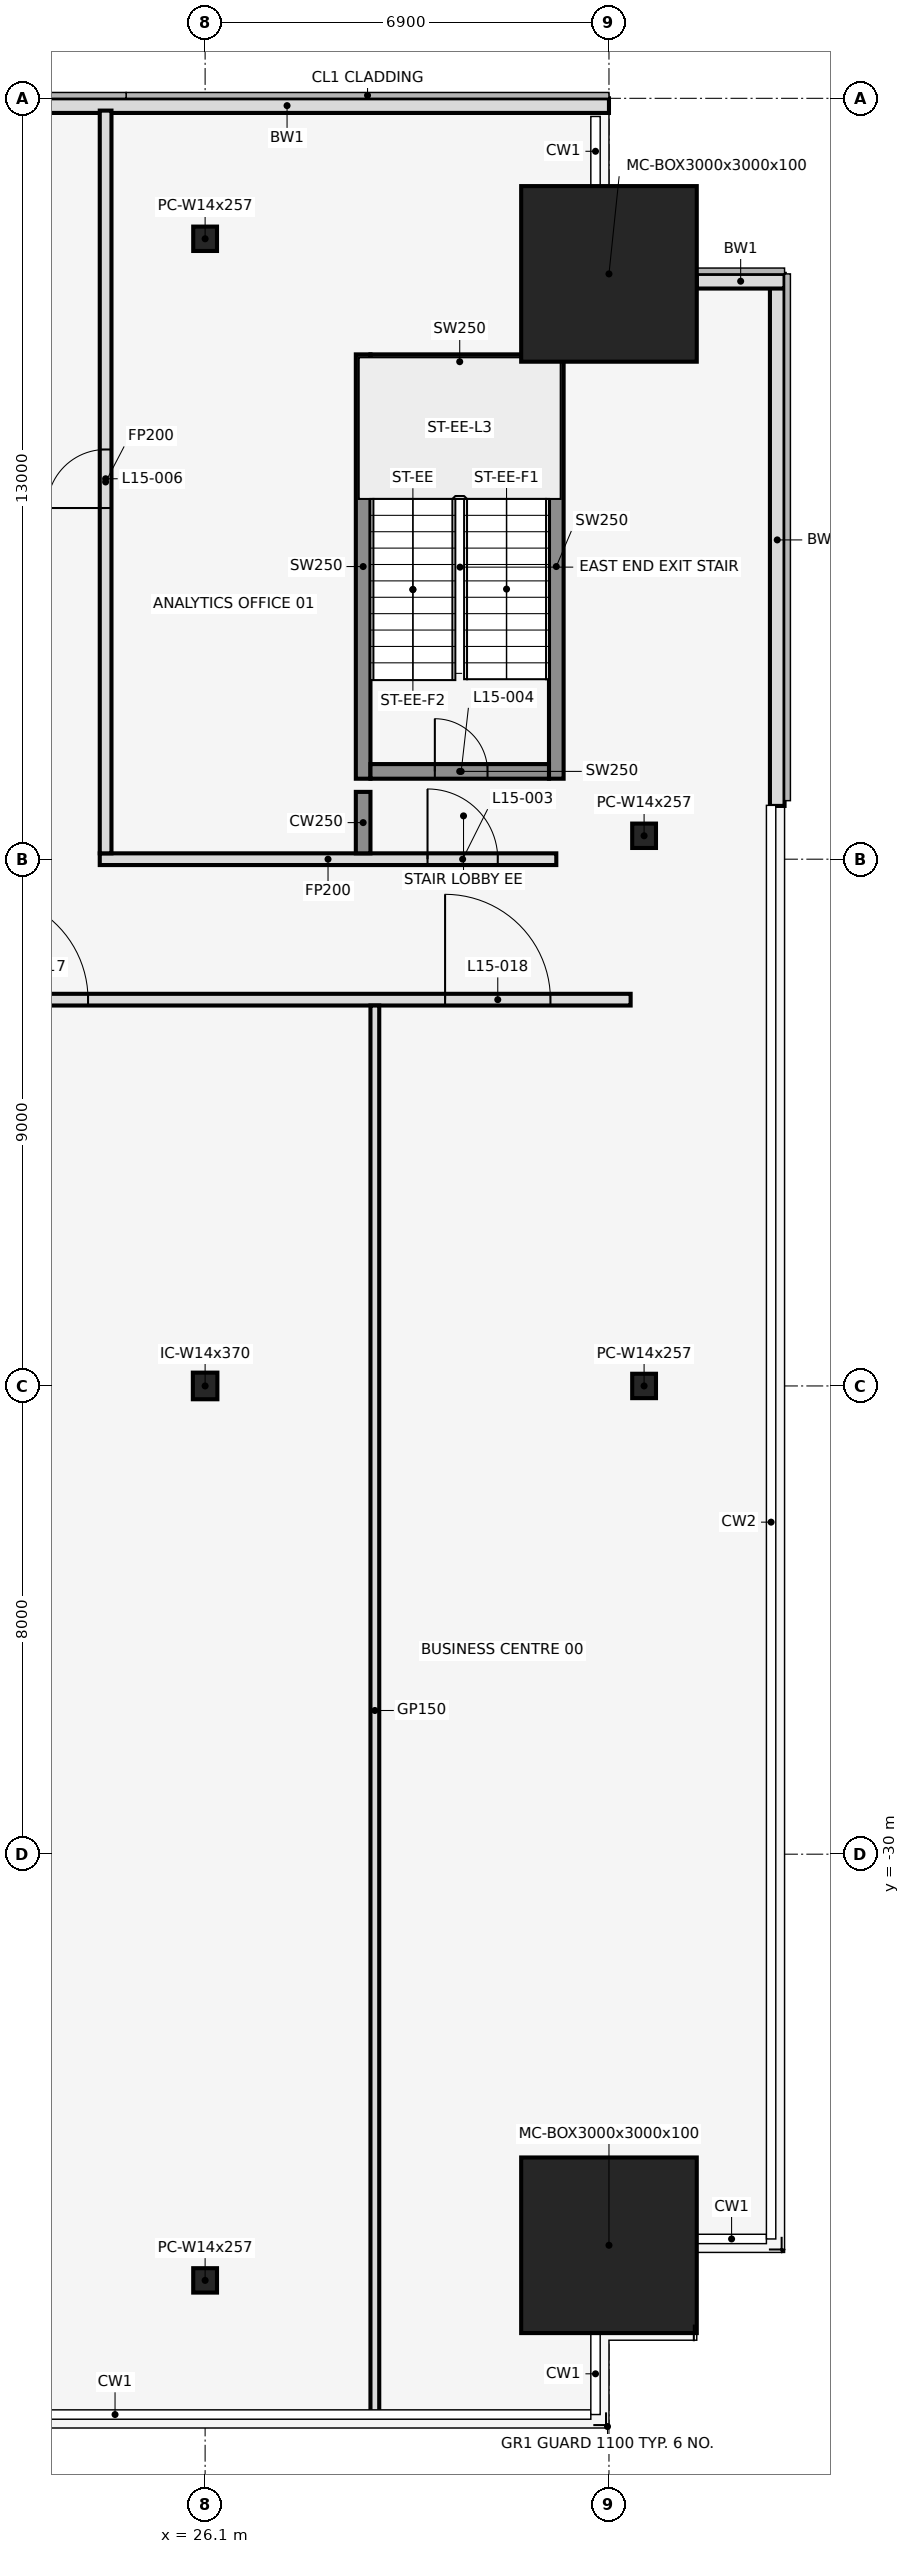
"""IFC4 building model, lengths in metres.
Left out: names, types, materials, properties, quantities, classifications, styles, units other than length and angle.
Written with IfcOpenShell. Run it as: python <this file> out.ifc"""

import sys

from ifc_helpers import new_model, si_unit, direction, frame, frame_2d, origin, origin_2d, place, context, subcontext, project, spatial, rectangle, hollow_rectangle, i_section, extrude, element, fill, save


model = new_model("IFC4")
c1 = context("Model", 3, precision=1e-05, world=origin(), true_north=direction((0.0, 1.0)))
c2 = subcontext(c1, "Body", "Model", "MODEL_VIEW")
j1 = project(units=[si_unit("LENGTHUNIT", "METRE"), si_unit("PLANEANGLEUNIT", "RADIAN")], contexts=[c1])
p1 = place(None, origin())
s1 = spatial("IfcSite", under=j1, at=p1, CompositionType="ELEMENT")
p2 = place(p1, origin())
s2 = spatial("IfcBuilding", under=s1, at=p2, CompositionType="ELEMENT")
p3 = place(p2, frame((0.0, 0.0, 75.5)))
s3 = spatial("IfcBuildingStorey", under=s2, at=p3, CompositionType="ELEMENT", Elevation=75.5)
for number, where, z_axis, x_axis in (
    (1, (26.1, -37.282, 0.0), (0.0, 0.0, 1.0), (1.0, 0.0, 0.0)),
    (2, (26.1, -2.4, 0.0), (0.0, 0.0, 1.0), (1.0, 0.0, 0.0)),
):
    element("IfcColumn", number, at=place(p3, frame(where, z_axis=z_axis, x_axis=x_axis)), inside=s3, PredefinedType="COLUMN", context=c2, shape_type="SweptSolid", body=[
        extrude(i_section(OverallWidth=0.406, OverallDepth=0.417, WebThickness=0.03, FlangeThickness=0.048, at=origin_2d()), origin(), (0.0, 0.0, 1.0), 4.5),
    ])
for number, where, z_axis, x_axis in (
    (3, (33.0, -36.682, 0.0), (0.0, 0.0, 1.0), (1.0, 0.0, 0.0)),
    (4, (33.0, -3.0, 0.0), (0.0, 0.0, 1.0), (1.0, 0.0, 0.0)),
):
    element("IfcColumn", number, at=place(p3, frame(where, z_axis=z_axis, x_axis=x_axis)), inside=s3, PredefinedType="COLUMN", context=c2, shape_type="SweptSolid", body=[
        extrude(hollow_rectangle(XDim=3.0, YDim=3.0, WallThickness=0.1, at=origin_2d()), origin(), (0.0, 0.0, 1.0), 4.5),
    ])
for number, where, z_axis, x_axis in (
    (5, (33.6, -12.6, 0.0), (0.0, 0.0, 1.0), (1.0, 0.0, 0.0)),
    (6, (33.6, -22.0, 0.0), (0.0, 0.0, 1.0), (1.0, 0.0, 0.0)),
):
    element("IfcColumn", number, at=place(p3, frame(where, z_axis=z_axis, x_axis=x_axis)), inside=s3, PredefinedType="COLUMN", context=c2, shape_type="SweptSolid", body=[
        extrude(i_section(OverallWidth=0.406, OverallDepth=0.417, WebThickness=0.03, FlangeThickness=0.048, at=origin_2d()), origin(), (0.0, 0.0, 1.0), 4.5),
    ])
p4 = place(p3, frame((26.1, -22.0, 0.0), z_axis=(0.0, 0.0, 1.0), x_axis=(1.0, 0.0, 0.0)))
e7 = element("IfcColumn", 7, at=p4, inside=s3, PredefinedType="COLUMN", context=c2, shape_type="SweptSolid", body=[
    extrude(i_section(OverallWidth=0.419, OverallDepth=0.455, WebThickness=0.042, FlangeThickness=0.068, at=origin_2d()), origin(), (0.0, 0.0, 1.0), 4.5),
])
p5 = place(p3, frame((33.0, -0.125, 0.0), z_axis=(0.0, 0.0, 1.0), x_axis=(-1.0, 0.0, 0.0)))
e8 = element("IfcWall", 8, at=p5, inside=s3, PredefinedType="STANDARD", context=c2, shape_type="SweptSolid", body=[
    extrude(rectangle(XDim=11.0, YDim=0.25, at=frame_2d((5.5, 0.0))), origin(), (0.0, 0.0, 1.0), 4.35),
])
p6 = place(p3, frame((35.875, -12.09, 0.0), z_axis=(0.0, 0.0, 1.0), x_axis=(0.0, 1.0, 0.0)))
e9 = element("IfcWall", 9, at=p6, inside=s3, PredefinedType="STANDARD", context=c2, shape_type="SweptSolid", body=[
    extrude(rectangle(XDim=9.09, YDim=0.25, at=frame_2d((4.545, 0.0))), origin(), (0.0, 0.0, 1.0), 4.35),
])
p7 = place(p3, frame((36.0, -3.125, 0.0), z_axis=(0.0, 0.0, 1.0), x_axis=(-1.0, 0.0, 0.0)))
e10 = element("IfcWall", 10, at=p7, inside=s3, PredefinedType="STANDARD", context=c2, shape_type="SweptSolid", body=[
    extrude(rectangle(XDim=1.5, YDim=0.25, at=frame_2d((0.75, 0.0))), origin(), (0.0, 0.0, 1.0), 4.35),
])
for number, where, z_axis, x_axis in (
    (11, (28.8, -11.625, 0.0), (0.0, 0.0, 1.0), (0.0, 1.0, 0.0)),
    (12, (32.1, -11.625, 0.0), (0.0, 0.0, 1.0), (0.0, 1.0, 0.0)),
):
    element("IfcWall", number, at=place(p3, frame(where, z_axis=z_axis, x_axis=x_axis)), inside=s3, PredefinedType="SHEAR", context=c2, shape_type="SweptSolid", body=[
        extrude(rectangle(XDim=7.25, YDim=0.25, at=frame_2d((3.625, 0.0))), origin(), (0.0, 0.0, 1.0), 4.5),
    ])
p8 = place(p3, frame((28.925, -11.5, 0.0), z_axis=(0.0, 0.0, 1.0), x_axis=(1.0, 0.0, 0.0)))
e13 = element("IfcWall", 13, at=p8, inside=s3, PredefinedType="SHEAR", context=c2, shape_type="SweptSolid", body=[
    extrude(rectangle(XDim=3.05, YDim=0.25, at=frame_2d((1.525, 0.0))), origin(), (0.0, 0.0, 1.0), 4.5),
])
p9 = place(p8, frame((1.1, 0.0, 0.0)))
e14 = element("IfcOpeningElement", 14, at=p9, cuts=e13, PredefinedType="OPENING", context=c2, shape_type="SweptSolid", body=[
    extrude(rectangle(XDim=0.9, YDim=2.1, at=frame_2d((0.45, 1.05))), frame((0.0, 0.137, 0.0), z_axis=(0.0, -1.0, 0.0), x_axis=(1.0, 0.0, 0.0)), (0.0, 0.0, 1.0), 0.274),
])
p10 = place(p3, frame((28.925, -4.5, 0.0), z_axis=(0.0, 0.0, 1.0), x_axis=(1.0, 0.0, 0.0)))
e15 = element("IfcWall", 15, at=p10, inside=s3, PredefinedType="SHEAR", context=c2, shape_type="SweptSolid", body=[
    extrude(rectangle(XDim=3.05, YDim=0.25, at=frame_2d((1.525, 0.0))), origin(), (0.0, 0.0, 1.0), 4.5),
])
p11 = place(p3, frame((-33.37, -15.4, 0.0), z_axis=(0.0, 0.0, 1.0), x_axis=(1.0, 0.0, 0.0)))
e16 = element("IfcWall", 16, at=p11, inside=s3, PredefinedType="PARTITIONING", context=c2, shape_type="SweptSolid", body=[
    extrude(rectangle(XDim=66.74, YDim=0.2, at=frame_2d((33.37, 0.0))), origin(), (0.0, 0.0, 1.0), 3.339),
])
p12 = place(p11, frame((1.3, 0.0, 0.0)))
e17 = element("IfcOpeningElement", 17, at=p12, cuts=e16, PredefinedType="OPENING", context=c2, shape_type="SweptSolid", body=[
    extrude(rectangle(XDim=1.8, YDim=2.1, at=frame_2d((0.9, 1.05))), frame((0.0, 0.112, 0.0), z_axis=(0.0, -1.0, 0.0), x_axis=(1.0, 0.0, 0.0)), (0.0, 0.0, 1.0), 0.224),
])
p13 = place(p11, frame((5.27, 0.0, 0.0)))
e18 = element("IfcOpeningElement", 18, at=p13, cuts=e16, PredefinedType="OPENING", context=c2, shape_type="SweptSolid", body=[
    extrude(rectangle(XDim=1.0, YDim=2.1, at=frame_2d((0.5, 1.05))), frame((0.0, 0.112, 0.0), z_axis=(0.0, -1.0, 0.0), x_axis=(1.0, 0.0, 0.0)), (0.0, 0.0, 1.0), 0.224),
])
p14 = place(p11, frame((10.77, 0.0, 0.0)))
e19 = element("IfcOpeningElement", 19, at=p14, cuts=e16, PredefinedType="OPENING", context=c2, shape_type="SweptSolid", body=[
    extrude(rectangle(XDim=1.8, YDim=2.1, at=frame_2d((0.9, 1.05))), frame((0.0, 0.112, 0.0), z_axis=(0.0, -1.0, 0.0), x_axis=(1.0, 0.0, 0.0)), (0.0, 0.0, 1.0), 0.224),
])
p15 = place(p11, frame((16.87, 0.0, 0.0)))
e20 = element("IfcOpeningElement", 20, at=p15, cuts=e16, PredefinedType="OPENING", context=c2, shape_type="SweptSolid", body=[
    extrude(rectangle(XDim=1.0, YDim=2.1, at=frame_2d((0.5, 1.05))), frame((0.0, 0.112, 0.0), z_axis=(0.0, -1.0, 0.0), x_axis=(1.0, 0.0, 0.0)), (0.0, 0.0, 1.0), 0.224),
])
p16 = place(p11, frame((22.27, 0.0, 0.0)))
e21 = element("IfcOpeningElement", 21, at=p16, cuts=e16, PredefinedType="OPENING", context=c2, shape_type="SweptSolid", body=[
    extrude(rectangle(XDim=1.8, YDim=2.1, at=frame_2d((0.9, 1.05))), frame((0.0, 0.112, 0.0), z_axis=(0.0, -1.0, 0.0), x_axis=(1.0, 0.0, 0.0)), (0.0, 0.0, 1.0), 0.224),
])
p17 = place(p11, frame((33.87, 0.0, 0.0)))
e22 = element("IfcOpeningElement", 22, at=p17, cuts=e16, PredefinedType="OPENING", context=c2, shape_type="SweptSolid", body=[
    extrude(rectangle(XDim=1.8, YDim=2.1, at=frame_2d((0.9, 1.05))), frame((0.0, 0.112, 0.0), z_axis=(0.0, -1.0, 0.0), x_axis=(1.0, 0.0, 0.0)), (0.0, 0.0, 1.0), 0.224),
])
p18 = place(p11, frame((45.97, 0.0, 0.0)))
e23 = element("IfcOpeningElement", 23, at=p18, cuts=e16, PredefinedType="OPENING", context=c2, shape_type="SweptSolid", body=[
    extrude(rectangle(XDim=0.9, YDim=2.1, at=frame_2d((0.45, 1.05))), frame((0.0, 0.112, 0.0), z_axis=(0.0, -1.0, 0.0), x_axis=(1.0, 0.0, 0.0)), (0.0, 0.0, 1.0), 0.224),
])
p19 = place(p11, frame((55.67, 0.0, 0.0)))
e24 = element("IfcOpeningElement", 24, at=p19, cuts=e16, PredefinedType="OPENING", context=c2, shape_type="SweptSolid", body=[
    extrude(rectangle(XDim=1.8, YDim=2.1, at=frame_2d((0.9, 1.05))), frame((0.0, 0.112, 0.0), z_axis=(0.0, -1.0, 0.0), x_axis=(1.0, 0.0, 0.0)), (0.0, 0.0, 1.0), 0.224),
])
p20 = place(p11, frame((63.57, 0.0, 0.0)))
e25 = element("IfcOpeningElement", 25, at=p20, cuts=e16, PredefinedType="OPENING", context=c2, shape_type="SweptSolid", body=[
    extrude(rectangle(XDim=1.8, YDim=2.1, at=frame_2d((0.9, 1.05))), frame((0.0, 0.112, 0.0), z_axis=(0.0, -1.0, 0.0), x_axis=(1.0, 0.0, 0.0)), (0.0, 0.0, 1.0), 0.224),
])
p21 = place(p3, frame((24.3, -13.0, 0.0), z_axis=(0.0, 0.0, 1.0), x_axis=(1.0, 0.0, 0.0)))
e26 = element("IfcWall", 26, at=p21, inside=s3, PredefinedType="PARTITIONING", context=c2, shape_type="SweptSolid", body=[
    extrude(rectangle(XDim=7.8, YDim=0.2, at=frame_2d((3.9, 0.0))), origin(), (0.0, 0.0, 1.0), 3.339),
])
p22 = place(p21, frame((5.6, 0.0, 0.0)))
e27 = element("IfcOpeningElement", 27, at=p22, cuts=e26, PredefinedType="OPENING", context=c2, shape_type="SweptSolid", body=[
    extrude(rectangle(XDim=1.2, YDim=2.1, at=frame_2d((0.6, 1.05))), frame((0.0, 0.112, 0.0), z_axis=(0.0, -1.0, 0.0), x_axis=(1.0, 0.0, 0.0)), (0.0, 0.0, 1.0), 0.224),
])
p23 = place(p3, frame((24.4, -12.9, 0.0), z_axis=(0.0, 0.0, 1.0), x_axis=(0.0, 1.0, 0.0)))
e28 = element("IfcWall", 28, at=p23, inside=s3, PredefinedType="PARTITIONING", context=c2, shape_type="SweptSolid", body=[
    extrude(rectangle(XDim=12.69, YDim=0.2, at=frame_2d((6.345, 0.0))), origin(), (0.0, 0.0, 1.0), 3.339),
])
p24 = place(p23, frame((5.9, 0.0, 0.0)))
e29 = element("IfcOpeningElement", 29, at=p24, cuts=e28, PredefinedType="OPENING", context=c2, shape_type="SweptSolid", body=[
    extrude(rectangle(XDim=1.0, YDim=2.1, at=frame_2d((0.5, 1.05))), frame((0.0, 0.112, 0.0), z_axis=(0.0, -1.0, 0.0), x_axis=(1.0, 0.0, 0.0)), (0.0, 0.0, 1.0), 0.224),
])
p25 = place(p3, frame((28.8, -12.9, 0.0), z_axis=(0.0, 0.0, 1.0), x_axis=(0.0, 1.0, 0.0)))
e30 = element("IfcWall", 30, at=p25, inside=s3, PredefinedType="SHEAR", context=c2, shape_type="SweptSolid", body=[
    extrude(rectangle(XDim=1.05, YDim=0.25, at=frame_2d((0.525, 0.0))), origin(), (0.0, 0.0, 1.0), 4.5),
])
p26 = place(p3, frame((29.0, -39.59, 0.0), z_axis=(0.0, 0.0, 1.0), x_axis=(0.0, 1.0, 0.0)))
e31 = element("IfcWall", 31, at=p26, inside=s3, PredefinedType="PARTITIONING", context=c2, shape_type="SweptSolid", body=[
    extrude(rectangle(XDim=24.09, YDim=0.15, at=frame_2d((12.045, 0.0))), origin(), (0.0, 0.0, 1.0), 3.339),
])
p27 = place(p22, origin())
e32 = element("IfcDoor", 32, at=p27, inside=s3, OperationType="SINGLE_SWING_RIGHT", PredefinedType="DOOR", context=c2, shape_type="SweptSolid", body=[
    extrude(rectangle(XDim=1.2, YDim=2.1, at=frame_2d((0.6, 1.05))), frame((0.0, 0.025, 0.0), z_axis=(0.0, -1.0, 0.0), x_axis=(1.0, 0.0, 0.0)), (0.0, 0.0, 1.0), 0.05),
])
fill(e27, e32)
p28 = place(p9, origin())
e33 = element("IfcDoor", 33, at=p28, inside=s3, OperationType="SINGLE_SWING_LEFT", PredefinedType="DOOR", context=c2, shape_type="SweptSolid", body=[
    extrude(rectangle(XDim=0.9, YDim=2.1, at=frame_2d((0.45, 1.05))), frame((0.0, 0.025, 0.0), z_axis=(0.0, -1.0, 0.0), x_axis=(1.0, 0.0, 0.0)), (0.0, 0.0, 1.0), 0.05),
])
fill(e14, e33)
p29 = place(p24, frame((1.0, 0.0, 0.0), z_axis=(0.0, 0.0, 1.0), x_axis=(-1.0, 0.0, 0.0)))
e34 = element("IfcDoor", 34, at=p29, inside=s3, OperationType="SINGLE_SWING_RIGHT", PredefinedType="DOOR", context=c2, shape_type="SweptSolid", body=[
    extrude(rectangle(XDim=1.0, YDim=2.1, at=frame_2d((0.5, 1.05))), frame((0.0, 0.025, 0.0), z_axis=(0.0, -1.0, 0.0), x_axis=(1.0, 0.0, 0.0)), (0.0, 0.0, 1.0), 0.05),
])
fill(e29, e34)
p30 = place(p19, origin())
e35 = element("IfcDoor", 35, at=p30, inside=s3, OperationType="SINGLE_SWING_LEFT", PredefinedType="DOOR", context=c2, shape_type="SweptSolid", body=[
    extrude(rectangle(XDim=1.8, YDim=2.1, at=frame_2d((0.9, 1.05))), frame((0.0, 0.025, 0.0), z_axis=(0.0, -1.0, 0.0), x_axis=(1.0, 0.0, 0.0)), (0.0, 0.0, 1.0), 0.05),
])
fill(e24, e35)
p31 = place(p20, origin())
e36 = element("IfcDoor", 36, at=p31, inside=s3, OperationType="SINGLE_SWING_LEFT", PredefinedType="DOOR", context=c2, shape_type="SweptSolid", body=[
    extrude(rectangle(XDim=1.8, YDim=2.1, at=frame_2d((0.9, 1.05))), frame((0.0, 0.025, 0.0), z_axis=(0.0, -1.0, 0.0), x_axis=(1.0, 0.0, 0.0)), (0.0, 0.0, 1.0), 0.05),
])
fill(e25, e36)
save(model, sys.argv[1])
